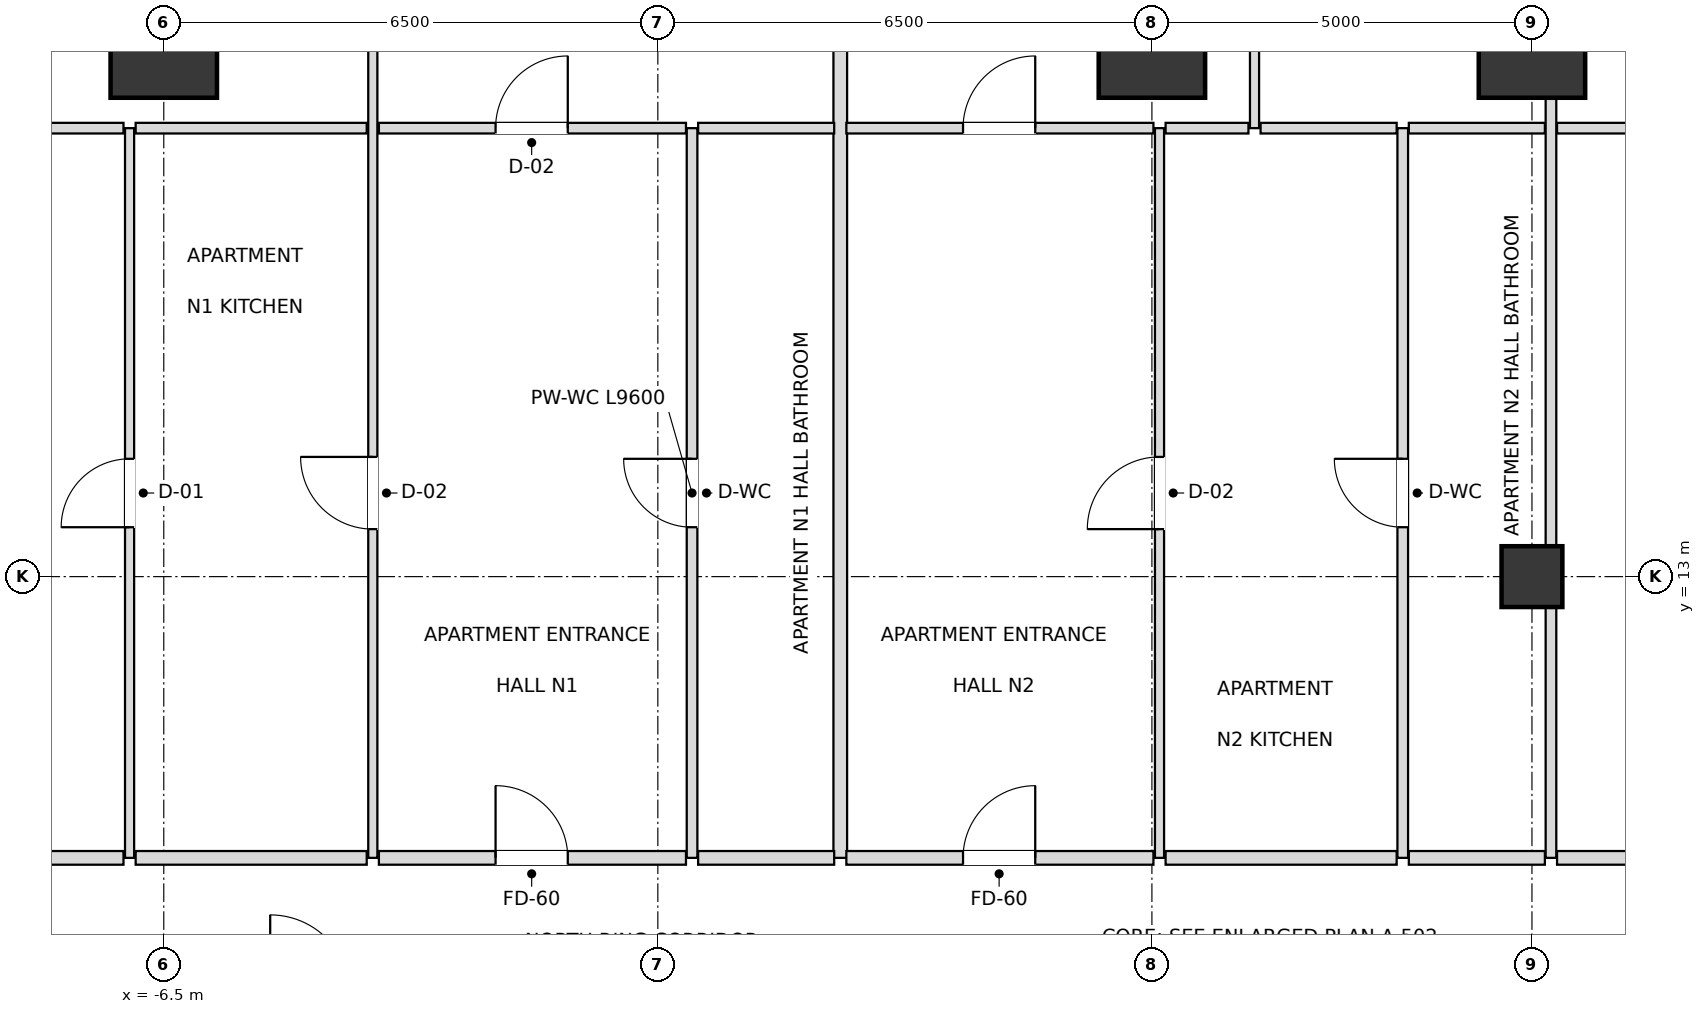
"""IFC4 building model, lengths in metres.
Left out: names, types, materials, properties, quantities, classifications, styles, units other than length and angle.
Written with IfcOpenShell. Run it as: python <this file> out.ifc"""

import sys

from ifc_helpers import new_model, si_unit, direction, frame, frame_2d, origin, origin_2d, place, context, subcontext, project, spatial, rectangle, extrude, element, fill, save


model = new_model("IFC4")
c1 = context("Model", 3, precision=1e-05, world=origin(), true_north=direction((0.0, 1.0)))
c2 = subcontext(c1, "Body", "Model", "MODEL_VIEW")
j1 = project(units=[si_unit("LENGTHUNIT", "METRE"), si_unit("PLANEANGLEUNIT", "RADIAN")], contexts=[c1])
p1 = place(None, origin())
s1 = spatial("IfcSite", under=j1, at=p1, CompositionType="ELEMENT")
p2 = place(p1, origin())
s2 = spatial("IfcBuilding", under=s1, at=p2, CompositionType="ELEMENT")
p3 = place(p2, frame((0.0, 0.0, 61.2)))
s3 = spatial("IfcBuildingStorey", under=s2, at=p3, CompositionType="ELEMENT", Elevation=61.2)
for number, where, z_axis, x_axis in (
    (1, (11.5, 20.0, 0.0), (0.0, 0.0, 1.0), (1.0, 0.0, 0.0)),
    (2, (6.5, 20.0, 0.0), (0.0, 0.0, 1.0), (1.0, 0.0, 0.0)),
    (3, (-6.5, 20.0, 0.0), (0.0, 0.0, 1.0), (1.0, 0.0, 0.0)),
):
    element("IfcColumn", number, at=place(p3, frame(where, z_axis=z_axis, x_axis=x_axis)), inside=s3, PredefinedType="USERDEFINED", context=c2, shape_type="SweptSolid", body=[
        extrude(rectangle(XDim=1.4, YDim=1.4, at=origin_2d()), origin(), (0.0, 0.0, 1.0), 3.6),
    ])
p4 = place(p3, frame((11.5, 13.0, 0.0), z_axis=(0.0, 0.0, 1.0), x_axis=(1.0, 0.0, 0.0)))
e4 = element("IfcColumn", 4, at=p4, inside=s3, PredefinedType="COLUMN", context=c2, shape_type="SweptSolid", body=[
    extrude(rectangle(XDim=0.8, YDim=0.8, at=origin_2d()), origin(), (0.0, 0.0, 1.0), 3.6),
])
p5 = place(p3, frame((-6.95, 9.3, 0.0), z_axis=(0.0, 0.0, 1.0), x_axis=(0.0, 1.0, 0.0)))
e5 = element("IfcWall", 5, at=p5, inside=s3, PredefinedType="PARTITIONING", context=c2, shape_type="SweptSolid", body=[
    extrude(rectangle(XDim=9.6, YDim=0.12, at=frame_2d((4.8, 0.0))), origin(), (0.0, 0.0, 1.0), 2.816),
])
p6 = place(p5, frame((4.35, 0.0, 0.0)))
e6 = element("IfcOpeningElement", 6, at=p6, cuts=e5, PredefinedType="OPENING", context=c2, shape_type="SweptSolid", body=[
    extrude(rectangle(XDim=0.9, YDim=2.1, at=frame_2d((0.45, 1.05))), frame((0.0, 0.07, 0.0), z_axis=(0.0, -1.0, 0.0), x_axis=(1.0, 0.0, 0.0)), (0.0, 0.0, 1.0), 0.14),
])
p7 = place(p3, frame((-3.75, 9.3, 0.0), z_axis=(0.0, 0.0, 1.0), x_axis=(0.0, 1.0, 0.0)))
e7 = element("IfcWall", 7, at=p7, inside=s3, PredefinedType="PARTITIONING", context=c2, shape_type="SweptSolid", body=[
    extrude(rectangle(XDim=15.6, YDim=0.12, at=frame_2d((7.8, 0.0))), origin(), (0.0, 0.0, 1.0), 2.816),
])
p8 = place(p7, frame((4.325, 0.0, 0.0)))
e8 = element("IfcOpeningElement", 8, at=p8, cuts=e7, PredefinedType="OPENING", context=c2, shape_type="SweptSolid", body=[
    extrude(rectangle(XDim=0.95, YDim=2.1, at=frame_2d((0.475, 1.05))), frame((0.0, 0.07, 0.0), z_axis=(0.0, -1.0, 0.0), x_axis=(1.0, 0.0, 0.0)), (0.0, 0.0, 1.0), 0.14),
])
p9 = place(p7, frame((12.15, 0.0, 0.0)))
e9 = element("IfcOpeningElement", 9, at=p9, cuts=e7, PredefinedType="OPENING", context=c2, shape_type="SweptSolid", body=[
    extrude(rectangle(XDim=0.9, YDim=2.1, at=frame_2d((0.45, 1.05))), frame((0.0, 0.07, 0.0), z_axis=(0.0, -1.0, 0.0), x_axis=(1.0, 0.0, 0.0)), (0.0, 0.0, 1.0), 0.14),
])
p10 = place(p3, frame((0.45, 9.3, 0.0), z_axis=(0.0, 0.0, 1.0), x_axis=(0.0, 1.0, 0.0)))
e10 = element("IfcWall", 10, at=p10, inside=s3, PredefinedType="PARTITIONING", context=c2, shape_type="SweptSolid", body=[
    extrude(rectangle(XDim=9.6, YDim=0.14, at=frame_2d((4.8, 0.0))), origin(), (0.0, 0.0, 1.0), 2.948),
])
p11 = place(p10, frame((4.35, 0.0, 0.0)))
e11 = element("IfcOpeningElement", 11, at=p11, cuts=e10, PredefinedType="OPENING", context=c2, shape_type="SweptSolid", body=[
    extrude(rectangle(XDim=0.9, YDim=2.1, at=frame_2d((0.45, 1.05))), frame((0.0, 0.08, 0.0), z_axis=(0.0, -1.0, 0.0), x_axis=(1.0, 0.0, 0.0)), (0.0, 0.0, 1.0), 0.16),
])
p12 = place(p3, frame((2.4, 9.3, 0.0), z_axis=(0.0, 0.0, 1.0), x_axis=(0.0, 1.0, 0.0)))
e12 = element("IfcWall", 12, at=p12, inside=s3, PredefinedType="PARTITIONING", context=c2, shape_type="SweptSolid", body=[
    extrude(rectangle(XDim=15.6, YDim=0.18, at=frame_2d((7.8, 0.0))), origin(), (0.0, 0.0, 1.0), 2.816),
])
p13 = place(p3, frame((6.6, 9.3, 0.0), z_axis=(0.0, 0.0, 1.0), x_axis=(0.0, 1.0, 0.0)))
e13 = element("IfcWall", 13, at=p13, inside=s3, PredefinedType="PARTITIONING", context=c2, shape_type="SweptSolid", body=[
    extrude(rectangle(XDim=9.6, YDim=0.12, at=frame_2d((4.8, 0.0))), origin(), (0.0, 0.0, 1.0), 2.816),
])
p14 = place(p13, frame((4.325, 0.0, 0.0)))
e14 = element("IfcOpeningElement", 14, at=p14, cuts=e13, PredefinedType="OPENING", context=c2, shape_type="SweptSolid", body=[
    extrude(rectangle(XDim=0.95, YDim=2.1, at=frame_2d((0.475, 1.05))), frame((0.0, 0.07, 0.0), z_axis=(0.0, -1.0, 0.0), x_axis=(1.0, 0.0, 0.0)), (0.0, 0.0, 1.0), 0.14),
])
p15 = place(p3, frame((7.85, 18.9, 0.0), z_axis=(0.0, 0.0, 1.0), x_axis=(0.0, 1.0, 0.0)))
e15 = element("IfcWall", 15, at=p15, inside=s3, PredefinedType="PARTITIONING", context=c2, shape_type="SweptSolid", body=[
    extrude(rectangle(XDim=6.0, YDim=0.12, at=frame_2d((3.0, 0.0))), origin(), (0.0, 0.0, 1.0), 2.816),
])
p16 = place(p15, frame((2.55, 0.0, 0.0)))
e16 = element("IfcOpeningElement", 16, at=p16, cuts=e15, PredefinedType="OPENING", context=c2, shape_type="SweptSolid", body=[
    extrude(rectangle(XDim=0.9, YDim=2.1, at=frame_2d((0.45, 1.05))), frame((0.0, 0.07, 0.0), z_axis=(0.0, -1.0, 0.0), x_axis=(1.0, 0.0, 0.0)), (0.0, 0.0, 1.0), 0.14),
])
p17 = place(p3, frame((9.8, 9.3, 0.0), z_axis=(0.0, 0.0, 1.0), x_axis=(0.0, 1.0, 0.0)))
e17 = element("IfcWall", 17, at=p17, inside=s3, PredefinedType="PARTITIONING", context=c2, shape_type="SweptSolid", body=[
    extrude(rectangle(XDim=9.6, YDim=0.14, at=frame_2d((4.8, 0.0))), origin(), (0.0, 0.0, 1.0), 2.816),
])
p18 = place(p17, frame((4.35, 0.0, 0.0)))
e18 = element("IfcOpeningElement", 18, at=p18, cuts=e17, PredefinedType="OPENING", context=c2, shape_type="SweptSolid", body=[
    extrude(rectangle(XDim=0.9, YDim=2.1, at=frame_2d((0.45, 1.05))), frame((0.0, 0.08, 0.0), z_axis=(0.0, -1.0, 0.0), x_axis=(1.0, 0.0, 0.0)), (0.0, 0.0, 1.0), 0.16),
])
p19 = place(p3, frame((11.75, 9.3, 0.0), z_axis=(0.0, 0.0, 1.0), x_axis=(0.0, 1.0, 0.0)))
e19 = element("IfcWall", 19, at=p19, inside=s3, PredefinedType="PARTITIONING", context=c2, shape_type="SweptSolid", body=[
    extrude(rectangle(XDim=15.6, YDim=0.14, at=frame_2d((7.8, 0.0))), origin(), (0.0, 0.0, 1.0), 2.736),
])
p20 = place(p19, frame((12.15, 0.0, 0.0)))
e20 = element("IfcOpeningElement", 20, at=p20, cuts=e19, PredefinedType="OPENING", context=c2, shape_type="SweptSolid", body=[
    extrude(rectangle(XDim=0.9, YDim=2.1, at=frame_2d((0.45, 1.05))), frame((0.0, 0.08, 0.0), z_axis=(0.0, -1.0, 0.0), x_axis=(1.0, 0.0, 0.0)), (0.0, 0.0, 1.0), 0.16),
])
p21 = place(p3, frame((-18.32, 9.3, 0.0), z_axis=(0.0, 0.0, 1.0), x_axis=(1.0, 0.0, 0.0)))
e21 = element("IfcWall", 21, at=p21, inside=s3, PredefinedType="PARTITIONING", context=c2, shape_type="SweptSolid", body=[
    extrude(rectangle(XDim=11.29, YDim=0.18, at=frame_2d((5.645, 0.0))), origin(), (0.0, 0.0, 1.0), 2.816),
])
p22 = place(p3, frame((-6.87, 9.3, 0.0), z_axis=(0.0, 0.0, 1.0), x_axis=(1.0, 0.0, 0.0)))
e22 = element("IfcWall", 22, at=p22, inside=s3, PredefinedType="PARTITIONING", context=c2, shape_type="SweptSolid", body=[
    extrude(rectangle(XDim=3.04, YDim=0.18, at=frame_2d((1.52, 0.0))), origin(), (0.0, 0.0, 1.0), 2.816),
])
p23 = place(p3, frame((-3.67, 9.3, 0.0), z_axis=(0.0, 0.0, 1.0), x_axis=(1.0, 0.0, 0.0)))
e23 = element("IfcWall", 23, at=p23, inside=s3, PredefinedType="PARTITIONING", context=c2, shape_type="SweptSolid", body=[
    extrude(rectangle(XDim=4.04, YDim=0.18, at=frame_2d((2.02, 0.0))), origin(), (0.0, 0.0, 1.0), 3.38),
])
p24 = place(p23, frame((1.535, 0.0, 0.0)))
e24 = element("IfcOpeningElement", 24, at=p24, cuts=e23, PredefinedType="OPENING", context=c2, shape_type="SweptSolid", body=[
    extrude(rectangle(XDim=0.95, YDim=2.15, at=frame_2d((0.475, 1.075))), frame((0.0, 0.1, 0.0), z_axis=(0.0, -1.0, 0.0), x_axis=(1.0, 0.0, 0.0)), (0.0, 0.0, 1.0), 0.2),
])
p25 = place(p3, frame((0.53, 9.3, 0.0), z_axis=(0.0, 0.0, 1.0), x_axis=(1.0, 0.0, 0.0)))
e25 = element("IfcWall", 25, at=p25, inside=s3, PredefinedType="PARTITIONING", context=c2, shape_type="SweptSolid", body=[
    extrude(rectangle(XDim=1.79, YDim=0.18, at=frame_2d((0.895, 0.0))), origin(), (0.0, 0.0, 1.0), 3.38),
])
p26 = place(p3, frame((2.48, 9.3, 0.0), z_axis=(0.0, 0.0, 1.0), x_axis=(1.0, 0.0, 0.0)))
e26 = element("IfcWall", 26, at=p26, inside=s3, PredefinedType="PARTITIONING", context=c2, shape_type="SweptSolid", body=[
    extrude(rectangle(XDim=4.04, YDim=0.18, at=frame_2d((2.02, 0.0))), origin(), (0.0, 0.0, 1.0), 3.38),
])
p27 = place(p26, frame((1.535, 0.0, 0.0)))
e27 = element("IfcOpeningElement", 27, at=p27, cuts=e26, PredefinedType="OPENING", context=c2, shape_type="SweptSolid", body=[
    extrude(rectangle(XDim=0.95, YDim=2.15, at=frame_2d((0.475, 1.075))), frame((0.0, 0.1, 0.0), z_axis=(0.0, -1.0, 0.0), x_axis=(1.0, 0.0, 0.0)), (0.0, 0.0, 1.0), 0.2),
])
p28 = place(p3, frame((6.68, 9.3, 0.0), z_axis=(0.0, 0.0, 1.0), x_axis=(1.0, 0.0, 0.0)))
e28 = element("IfcWall", 28, at=p28, inside=s3, PredefinedType="PARTITIONING", context=c2, shape_type="SweptSolid", body=[
    extrude(rectangle(XDim=3.04, YDim=0.18, at=frame_2d((1.52, 0.0))), origin(), (0.0, 0.0, 1.0), 3.38),
])
p29 = place(p3, frame((9.88, 9.3, 0.0), z_axis=(0.0, 0.0, 1.0), x_axis=(1.0, 0.0, 0.0)))
e29 = element("IfcWall", 29, at=p29, inside=s3, PredefinedType="PARTITIONING", context=c2, shape_type="SweptSolid", body=[
    extrude(rectangle(XDim=1.79, YDim=0.18, at=frame_2d((0.895, 0.0))), origin(), (0.0, 0.0, 1.0), 3.38),
])
p30 = place(p3, frame((11.83, 9.3, 0.0), z_axis=(0.0, 0.0, 1.0), x_axis=(1.0, 0.0, 0.0)))
e30 = element("IfcWall", 30, at=p30, inside=s3, PredefinedType="PARTITIONING", context=c2, shape_type="SweptSolid", body=[
    extrude(rectangle(XDim=6.49, YDim=0.18, at=frame_2d((3.245, 0.0))), origin(), (0.0, 0.0, 1.0), 2.816),
])
p31 = place(p3, frame((-8.57, 18.9, 0.0), z_axis=(0.0, 0.0, 1.0), x_axis=(1.0, 0.0, 0.0)))
e31 = element("IfcWall", 31, at=p31, inside=s3, PredefinedType="PARTITIONING", context=c2, shape_type="SweptSolid", body=[
    extrude(rectangle(XDim=1.54, YDim=0.14, at=frame_2d((0.77, 0.0))), origin(), (0.0, 0.0, 1.0), 3.38),
])
p32 = place(p3, frame((-6.87, 18.9, 0.0), z_axis=(0.0, 0.0, 1.0), x_axis=(1.0, 0.0, 0.0)))
e32 = element("IfcWall", 32, at=p32, inside=s3, PredefinedType="PARTITIONING", context=c2, shape_type="SweptSolid", body=[
    extrude(rectangle(XDim=3.04, YDim=0.14, at=frame_2d((1.52, 0.0))), origin(), (0.0, 0.0, 1.0), 2.816),
])
p33 = place(p3, frame((-3.67, 18.9, 0.0), z_axis=(0.0, 0.0, 1.0), x_axis=(1.0, 0.0, 0.0)))
e33 = element("IfcWall", 33, at=p33, inside=s3, PredefinedType="PARTITIONING", context=c2, shape_type="SweptSolid", body=[
    extrude(rectangle(XDim=4.04, YDim=0.14, at=frame_2d((2.02, 0.0))), origin(), (0.0, 0.0, 1.0), 3.38),
])
p34 = place(p33, frame((1.535, 0.0, 0.0)))
e34 = element("IfcOpeningElement", 34, at=p34, cuts=e33, PredefinedType="OPENING", context=c2, shape_type="SweptSolid", body=[
    extrude(rectangle(XDim=0.95, YDim=2.1, at=frame_2d((0.475, 1.05))), frame((0.0, 0.08, 0.0), z_axis=(0.0, -1.0, 0.0), x_axis=(1.0, 0.0, 0.0)), (0.0, 0.0, 1.0), 0.16),
])
p35 = place(p3, frame((0.53, 18.9, 0.0), z_axis=(0.0, 0.0, 1.0), x_axis=(1.0, 0.0, 0.0)))
e35 = element("IfcWall", 35, at=p35, inside=s3, PredefinedType="PARTITIONING", context=c2, shape_type="SweptSolid", body=[
    extrude(rectangle(XDim=1.79, YDim=0.14, at=frame_2d((0.895, 0.0))), origin(), (0.0, 0.0, 1.0), 3.38),
])
p36 = place(p3, frame((2.48, 18.9, 0.0), z_axis=(0.0, 0.0, 1.0), x_axis=(1.0, 0.0, 0.0)))
e36 = element("IfcWall", 36, at=p36, inside=s3, PredefinedType="PARTITIONING", context=c2, shape_type="SweptSolid", body=[
    extrude(rectangle(XDim=4.04, YDim=0.14, at=frame_2d((2.02, 0.0))), origin(), (0.0, 0.0, 1.0), 3.38),
])
p37 = place(p36, frame((1.535, 0.0, 0.0)))
e37 = element("IfcOpeningElement", 37, at=p37, cuts=e36, PredefinedType="OPENING", context=c2, shape_type="SweptSolid", body=[
    extrude(rectangle(XDim=0.95, YDim=2.1, at=frame_2d((0.475, 1.05))), frame((0.0, 0.08, 0.0), z_axis=(0.0, -1.0, 0.0), x_axis=(1.0, 0.0, 0.0)), (0.0, 0.0, 1.0), 0.16),
])
p38 = place(p3, frame((6.68, 18.9, 0.0), z_axis=(0.0, 0.0, 1.0), x_axis=(1.0, 0.0, 0.0)))
e38 = element("IfcWall", 38, at=p38, inside=s3, PredefinedType="PARTITIONING", context=c2, shape_type="SweptSolid", body=[
    extrude(rectangle(XDim=1.09, YDim=0.14, at=frame_2d((0.545, 0.0))), origin(), (0.0, 0.0, 1.0), 3.38),
])
p39 = place(p3, frame((7.93, 18.9, 0.0), z_axis=(0.0, 0.0, 1.0), x_axis=(1.0, 0.0, 0.0)))
e39 = element("IfcWall", 39, at=p39, inside=s3, PredefinedType="PARTITIONING", context=c2, shape_type="SweptSolid", body=[
    extrude(rectangle(XDim=1.79, YDim=0.14, at=frame_2d((0.895, 0.0))), origin(), (0.0, 0.0, 1.0), 3.38),
])
p40 = place(p3, frame((9.88, 18.9, 0.0), z_axis=(0.0, 0.0, 1.0), x_axis=(1.0, 0.0, 0.0)))
e40 = element("IfcWall", 40, at=p40, inside=s3, PredefinedType="PARTITIONING", context=c2, shape_type="SweptSolid", body=[
    extrude(rectangle(XDim=1.79, YDim=0.14, at=frame_2d((0.895, 0.0))), origin(), (0.0, 0.0, 1.0), 2.736),
])
p41 = place(p3, frame((11.83, 18.9, 0.0), z_axis=(0.0, 0.0, 1.0), x_axis=(1.0, 0.0, 0.0)))
e41 = element("IfcWall", 41, at=p41, inside=s3, PredefinedType="PARTITIONING", context=c2, shape_type="SweptSolid", body=[
    extrude(rectangle(XDim=3.34, YDim=0.14, at=frame_2d((1.67, 0.0))), origin(), (0.0, 0.0, 1.0), 2.736),
])
p42 = place(p41, frame((1.195, 0.0, 0.0)))
e42 = element("IfcOpeningElement", 42, at=p42, cuts=e41, PredefinedType="OPENING", context=c2, shape_type="SweptSolid", body=[
    extrude(rectangle(XDim=0.95, YDim=2.1, at=frame_2d((0.475, 1.05))), frame((0.0, 0.08, 0.0), z_axis=(0.0, -1.0, 0.0), x_axis=(1.0, 0.0, 0.0)), (0.0, 0.0, 1.0), 0.16),
])
p43 = place(p11, origin())
e43 = element("IfcDoor", 43, at=p43, inside=s3, OperationType="SINGLE_SWING_RIGHT", PredefinedType="DOOR", context=c2, shape_type="SweptSolid", body=[
    extrude(rectangle(XDim=0.9, YDim=2.1, at=frame_2d((0.45, 1.05))), frame((0.0, 0.025, 0.0), z_axis=(0.0, -1.0, 0.0), x_axis=(1.0, 0.0, 0.0)), (0.0, 0.0, 1.0), 0.05),
])
fill(e11, e43)
p44 = place(p24, origin())
e44 = element("IfcDoor", 44, at=p44, inside=s3, OperationType="SINGLE_SWING_LEFT", PredefinedType="DOOR", context=c2, shape_type="SweptSolid", body=[
    extrude(rectangle(XDim=0.95, YDim=2.15, at=frame_2d((0.475, 1.075))), frame((0.0, 0.025, 0.0), z_axis=(0.0, -1.0, 0.0), x_axis=(1.0, 0.0, 0.0)), (0.0, 0.0, 1.0), 0.05),
])
fill(e24, e44)
p45 = place(p8, origin())
e45 = element("IfcDoor", 45, at=p45, inside=s3, OperationType="SINGLE_SWING_RIGHT", PredefinedType="DOOR", context=c2, shape_type="SweptSolid", body=[
    extrude(rectangle(XDim=0.95, YDim=2.1, at=frame_2d((0.475, 1.05))), frame((0.0, 0.025, 0.0), z_axis=(0.0, -1.0, 0.0), x_axis=(1.0, 0.0, 0.0)), (0.0, 0.0, 1.0), 0.05),
])
fill(e8, e45)
p46 = place(p6, origin())
e46 = element("IfcDoor", 46, at=p46, inside=s3, OperationType="SINGLE_SWING_LEFT", PredefinedType="DOOR", context=c2, shape_type="SweptSolid", body=[
    extrude(rectangle(XDim=0.9, YDim=2.1, at=frame_2d((0.45, 1.05))), frame((0.0, 0.025, 0.0), z_axis=(0.0, -1.0, 0.0), x_axis=(1.0, 0.0, 0.0)), (0.0, 0.0, 1.0), 0.05),
])
fill(e6, e46)
p47 = place(p34, origin())
e47 = element("IfcDoor", 47, at=p47, inside=s3, OperationType="SINGLE_SWING_RIGHT", PredefinedType="DOOR", context=c2, shape_type="SweptSolid", body=[
    extrude(rectangle(XDim=0.95, YDim=2.1, at=frame_2d((0.475, 1.05))), frame((0.0, 0.025, 0.0), z_axis=(0.0, -1.0, 0.0), x_axis=(1.0, 0.0, 0.0)), (0.0, 0.0, 1.0), 0.05),
])
fill(e34, e47)
p48 = place(p27, origin())
e48 = element("IfcDoor", 48, at=p48, inside=s3, OperationType="SINGLE_SWING_RIGHT", PredefinedType="DOOR", context=c2, shape_type="SweptSolid", body=[
    extrude(rectangle(XDim=0.95, YDim=2.15, at=frame_2d((0.475, 1.075))), frame((0.0, 0.025, 0.0), z_axis=(0.0, -1.0, 0.0), x_axis=(1.0, 0.0, 0.0)), (0.0, 0.0, 1.0), 0.05),
])
fill(e27, e48)
p49 = place(p14, origin())
e49 = element("IfcDoor", 49, at=p49, inside=s3, OperationType="SINGLE_SWING_LEFT", PredefinedType="DOOR", context=c2, shape_type="SweptSolid", body=[
    extrude(rectangle(XDim=0.95, YDim=2.1, at=frame_2d((0.475, 1.05))), frame((0.0, 0.025, 0.0), z_axis=(0.0, -1.0, 0.0), x_axis=(1.0, 0.0, 0.0)), (0.0, 0.0, 1.0), 0.05),
])
fill(e14, e49)
p50 = place(p18, origin())
e50 = element("IfcDoor", 50, at=p50, inside=s3, OperationType="SINGLE_SWING_RIGHT", PredefinedType="DOOR", context=c2, shape_type="SweptSolid", body=[
    extrude(rectangle(XDim=0.9, YDim=2.1, at=frame_2d((0.45, 1.05))), frame((0.0, 0.025, 0.0), z_axis=(0.0, -1.0, 0.0), x_axis=(1.0, 0.0, 0.0)), (0.0, 0.0, 1.0), 0.05),
])
fill(e18, e50)
p51 = place(p37, origin())
e51 = element("IfcDoor", 51, at=p51, inside=s3, OperationType="SINGLE_SWING_RIGHT", PredefinedType="DOOR", context=c2, shape_type="SweptSolid", body=[
    extrude(rectangle(XDim=0.95, YDim=2.1, at=frame_2d((0.475, 1.05))), frame((0.0, 0.025, 0.0), z_axis=(0.0, -1.0, 0.0), x_axis=(1.0, 0.0, 0.0)), (0.0, 0.0, 1.0), 0.05),
])
fill(e37, e51)
save(model, sys.argv[1])
